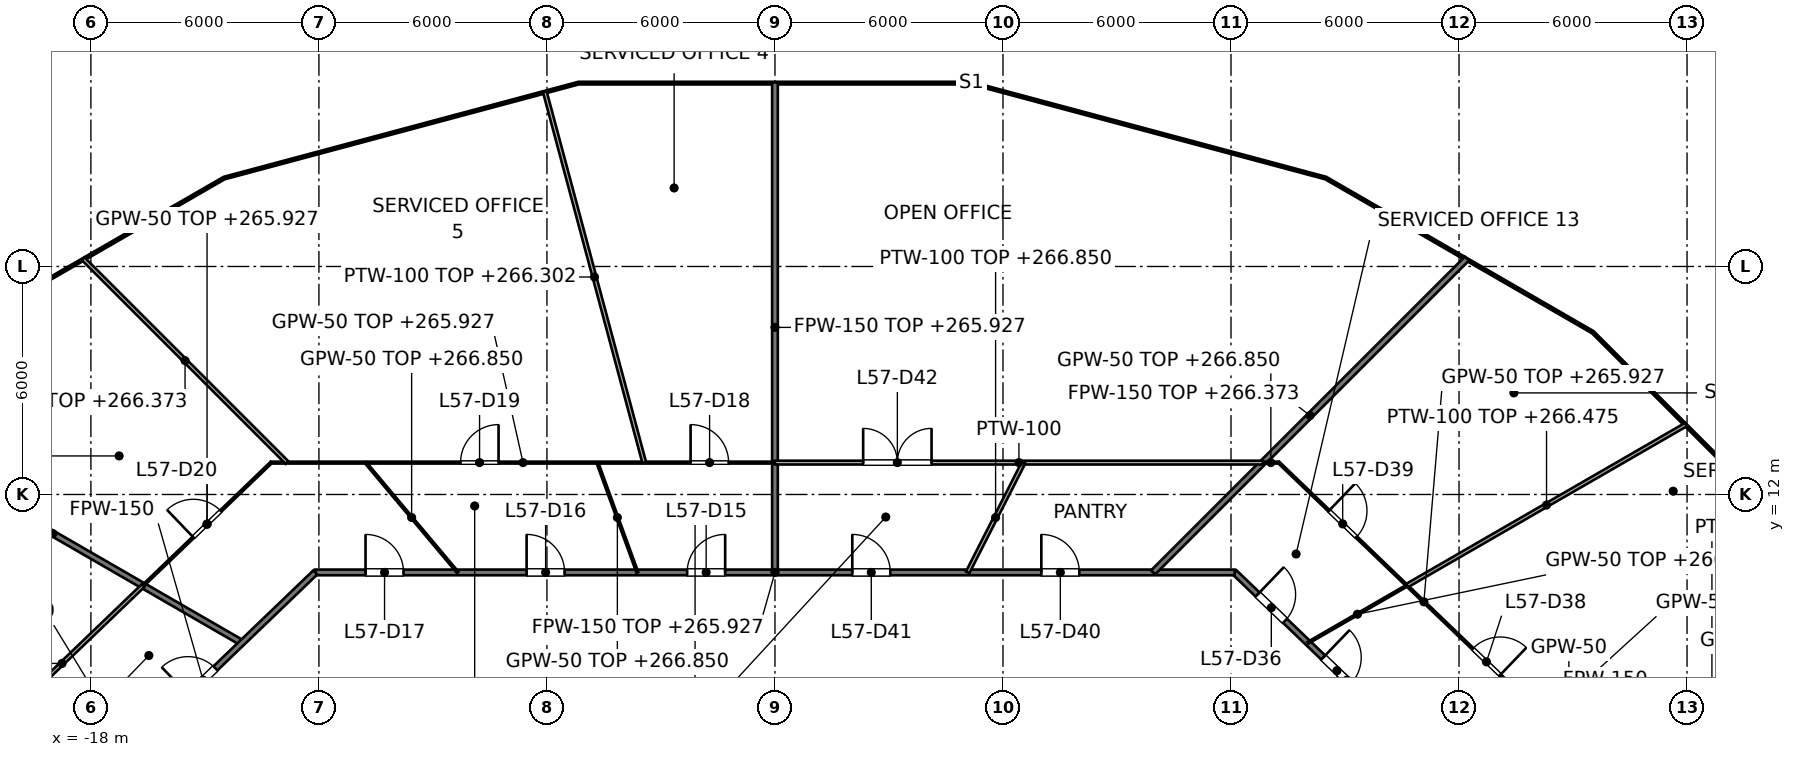
"""IFC4 building model, lengths in metres.
Left out: names, types, materials, properties, quantities, classifications, styles, units other than length and angle.
Written with IfcOpenShell. Run it as: python <this file> out.ifc"""

import sys

from ifc_helpers import new_model, si_unit, direction, frame, frame_2d, origin, place, context, subcontext, project, spatial, rectangle, extrude, element, fill, save


model = new_model("IFC4")
c1 = context("Model", 3, precision=1e-05, world=origin(), true_north=direction((0.0, 1.0)))
c2 = subcontext(c1, "Body", "Model", "MODEL_VIEW")
j1 = project(units=[si_unit("LENGTHUNIT", "METRE"), si_unit("PLANEANGLEUNIT", "RADIAN")], contexts=[c1])
p1 = place(None, origin())
s1 = spatial("IfcSite", under=j1, at=p1, CompositionType="ELEMENT")
p2 = place(p1, origin())
s2 = spatial("IfcBuilding", under=s1, at=p2, CompositionType="ELEMENT")
p3 = place(p2, frame((0.0, 0.0, 263.0)))
s3 = spatial("IfcBuildingStorey", under=s2, at=p3, CompositionType="ELEMENT", Elevation=263.0)
p4 = place(p3, frame((12.095, 9.949, 0.0), z_axis=(0.0, 0.0, 1.0), x_axis=(0.721290181137, -0.692633001376, 0.0)))
e1 = element("IfcWall", 1, at=p4, inside=s3, PredefinedType="PARTITIONING", context=c2, shape_type="SweptSolid", body=[
    extrude(rectangle(XDim=8.187, YDim=0.15, at=frame_2d((4.094, 0.0))), origin(), (0.0, 0.0, 1.0), 2.918),
])
p5 = place(p4, frame((3.232, 0.0, 0.0)))
e2 = element("IfcOpeningElement", 2, at=p5, cuts=e1, PredefinedType="OPENING", context=c2, shape_type="SweptSolid", body=[
    extrude(rectangle(XDim=1.0, YDim=2.1, at=frame_2d((0.5, 1.05))), frame((0.0, 0.075, 0.0), z_axis=(0.0, -1.0, 0.0), x_axis=(1.0, 0.0, 0.0)), (0.0, 0.0, 1.0), 0.15),
])
p6 = place(p4, frame((0.839, 0.0, 0.0)))
e3 = element("IfcOpeningElement", 3, at=p6, cuts=e1, PredefinedType="OPENING", context=c2, shape_type="SweptSolid", body=[
    extrude(rectangle(XDim=1.0, YDim=2.1, at=frame_2d((0.5, 1.05))), frame((0.0, 0.075, 0.0), z_axis=(0.0, -1.0, 0.0), x_axis=(1.0, 0.0, 0.0)), (0.0, 0.0, 1.0), 0.15),
])
p7 = place(p3, frame((-23.976, 13.843, 0.0), z_axis=(0.0, 0.0, 1.0), x_axis=(0.866017183011, -0.500014238528, 0.0)))
e4 = element("IfcWall", 4, at=p7, inside=s3, PredefinedType="PARTITIONING", context=c2, shape_type="SweptSolid", body=[
    extrude(rectangle(XDim=11.492, YDim=0.15, at=frame_2d((5.746, 0.0))), origin(), (0.0, 0.0, 1.0), 3.475),
])
p8 = place(p3, frame((-12.095, 9.949, 0.0), z_axis=(0.0, 0.0, 1.0), x_axis=(1.0, 0.0, 0.0)))
e5 = element("IfcWall", 5, at=p8, inside=s3, PredefinedType="PARTITIONING", context=c2, shape_type="SweptSolid", body=[
    extrude(rectangle(XDim=24.19, YDim=0.15, at=frame_2d((12.095, 0.0))), origin(), (0.0, 0.0, 1.0), 2.927),
])
p9 = place(p8, frame((9.784, 0.0, 0.0)))
e6 = element("IfcOpeningElement", 6, at=p9, cuts=e5, PredefinedType="OPENING", context=c2, shape_type="SweptSolid", body=[
    extrude(rectangle(XDim=1.0, YDim=2.1, at=frame_2d((0.5, 1.05))), frame((0.0, 0.075, 0.0), z_axis=(0.0, -1.0, 0.0), x_axis=(1.0, 0.0, 0.0)), (0.0, 0.0, 1.0), 0.15),
])
p10 = place(p8, frame((5.56, 0.0, 0.0)))
e7 = element("IfcOpeningElement", 7, at=p10, cuts=e5, PredefinedType="OPENING", context=c2, shape_type="SweptSolid", body=[
    extrude(rectangle(XDim=1.0, YDim=2.1, at=frame_2d((0.5, 1.05))), frame((0.0, 0.075, 0.0), z_axis=(0.0, -1.0, 0.0), x_axis=(1.0, 0.0, 0.0)), (0.0, 0.0, 1.0), 0.15),
])
p11 = place(p8, frame((1.322, 0.0, 0.0)))
e8 = element("IfcOpeningElement", 8, at=p11, cuts=e5, PredefinedType="OPENING", context=c2, shape_type="SweptSolid", body=[
    extrude(rectangle(XDim=1.0, YDim=2.1, at=frame_2d((0.5, 1.05))), frame((0.0, 0.075, 0.0), z_axis=(0.0, -1.0, 0.0), x_axis=(1.0, 0.0, 0.0)), (0.0, 0.0, 1.0), 0.15),
])
p12 = place(p8, frame((19.104, 0.0, 0.0)))
e9 = element("IfcOpeningElement", 9, at=p12, cuts=e5, PredefinedType="OPENING", context=c2, shape_type="SweptSolid", body=[
    extrude(rectangle(XDim=1.0, YDim=2.1, at=frame_2d((0.5, 1.05))), frame((0.0, 0.075, 0.0), z_axis=(0.0, -1.0, 0.0), x_axis=(1.0, 0.0, 0.0)), (0.0, 0.0, 1.0), 0.15),
])
p13 = place(p8, frame((14.129, 0.0, 0.0)))
e10 = element("IfcOpeningElement", 10, at=p13, cuts=e5, PredefinedType="OPENING", context=c2, shape_type="SweptSolid", body=[
    extrude(rectangle(XDim=1.0, YDim=2.1, at=frame_2d((0.5, 1.05))), frame((0.0, 0.075, 0.0), z_axis=(0.0, -1.0, 0.0), x_axis=(1.0, 0.0, 0.0)), (0.0, 0.0, 1.0), 0.15),
])
p14 = place(p3, frame((-18.0, 4.278, 0.0), z_axis=(0.0, 0.0, 1.0), x_axis=(0.721260976692, 0.69266341285, 0.0)))
e11 = element("IfcWall", 11, at=p14, inside=s3, PredefinedType="PARTITIONING", context=c2, shape_type="SweptSolid", body=[
    extrude(rectangle(XDim=8.187, YDim=0.15, at=frame_2d((4.094, 0.0))), origin(), (0.0, 0.0, 1.0), 2.918),
])
p15 = place(p14, frame((3.544, 0.0, 0.0)))
e12 = element("IfcOpeningElement", 12, at=p15, cuts=e11, PredefinedType="OPENING", context=c2, shape_type="SweptSolid", body=[
    extrude(rectangle(XDim=1.0, YDim=2.1, at=frame_2d((0.5, 1.05))), frame((0.0, 0.075, 0.0), z_axis=(0.0, -1.0, 0.0), x_axis=(1.0, 0.0, 0.0)), (0.0, 0.0, 1.0), 0.15),
])
p16 = place(p3, frame((9.949, 9.949, 0.0), z_axis=(0.0, 0.0, 1.0), x_axis=(0.707106781187, 0.707106781187, 0.0)))
e13 = element("IfcWall", 13, at=p16, inside=s3, PredefinedType="PARTITIONING", context=c2, shape_type="SweptSolid", body=[
    extrude(rectangle(XDim=11.677, YDim=0.15, at=frame_2d((5.839, 0.0))), origin(), (0.0, 0.0, 1.0), 3.373),
])
p17 = place(p3, frame((0.0, 9.949, 0.0), z_axis=(0.0, 0.0, 1.0), x_axis=(0.0, 1.0, 0.0)))
e14 = element("IfcWall", 14, at=p17, inside=s3, PredefinedType="PARTITIONING", context=c2, shape_type="SweptSolid", body=[
    extrude(rectangle(XDim=12.896, YDim=0.15, at=frame_2d((6.448, 0.0))), origin(), (0.0, 0.0, 1.0), 2.927),
])
p18 = place(p3, frame((-4.673, 12.839, 0.0), z_axis=(0.0, 0.0, 1.0), x_axis=(0.342042598731, -0.939684447383, 0.0)))
e15 = element("IfcWall", 15, at=p18, inside=s3, PredefinedType="PARTITIONING", context=c2, shape_type="SweptSolid", body=[
    extrude(rectangle(XDim=3.076, YDim=0.05, at=frame_2d((1.538, 0.0))), origin(), (0.0, 0.0, 1.0), 3.85),
])
p19 = place(p3, frame((-10.773, 12.839, 0.0), z_axis=(0.0, 0.0, 1.0), x_axis=(0.642777681898, -0.766052773413, 0.0)))
e16 = element("IfcWall", 16, at=p19, inside=s3, PredefinedType="PARTITIONING", context=c2, shape_type="SweptSolid", body=[
    extrude(rectangle(XDim=3.773, YDim=0.05, at=frame_2d((1.886, 0.0))), origin(), (0.0, 0.0, 1.0), 3.85),
])
p20 = place(p3, frame((13.258, 12.839, 0.0), z_axis=(0.0, 0.0, 1.0), x_axis=(0.721469843217, -0.692445857327, 0.0)))
e17 = element("IfcWall", 17, at=p20, inside=s3, PredefinedType="PARTITIONING", context=c2, shape_type="SweptSolid", body=[
    extrude(rectangle(XDim=10.582, YDim=0.05, at=frame_2d((5.291, 0.0))), origin(), (0.0, 0.0, 1.0), 2.927),
])
p21 = place(p20, frame((7.072, 0.0, 0.0)))
e18 = element("IfcOpeningElement", 18, at=p21, cuts=e17, PredefinedType="OPENING", context=c2, shape_type="SweptSolid", body=[
    extrude(rectangle(XDim=1.0, YDim=2.1, at=frame_2d((0.5, 1.05))), frame((0.0, 0.025, 0.0), z_axis=(0.0, -1.0, 0.0), x_axis=(1.0, 0.0, 0.0)), (0.0, 0.0, 1.0), 0.05),
])
p22 = place(p20, frame((1.83, 0.0, 0.0)))
e19 = element("IfcOpeningElement", 19, at=p22, cuts=e17, PredefinedType="OPENING", context=c2, shape_type="SweptSolid", body=[
    extrude(rectangle(XDim=1.0, YDim=2.1, at=frame_2d((0.5, 1.05))), frame((0.0, 0.025, 0.0), z_axis=(0.0, -1.0, 0.0), x_axis=(1.0, 0.0, 0.0)), (0.0, 0.0, 1.0), 0.05),
])
p23 = place(p3, frame((-13.258, 12.839, 0.0), z_axis=(0.0, 0.0, 1.0), x_axis=(1.0, 0.0, 0.0)))
e20 = element("IfcWall", 20, at=p23, inside=s3, PredefinedType="PARTITIONING", context=c2, shape_type="SweptSolid", body=[
    extrude(rectangle(XDim=13.258, YDim=0.05, at=frame_2d((6.629, 0.0))), origin(), (0.0, 0.0, 1.0), 2.927),
])
p24 = place(p23, frame((11.038, 0.0, 0.0)))
e21 = element("IfcOpeningElement", 21, at=p24, cuts=e20, PredefinedType="OPENING", context=c2, shape_type="SweptSolid", body=[
    extrude(rectangle(XDim=1.0, YDim=2.1, at=frame_2d((0.5, 1.05))), frame((0.0, 0.025, 0.0), z_axis=(0.0, -1.0, 0.0), x_axis=(1.0, 0.0, 0.0)), (0.0, 0.0, 1.0), 0.05),
])
p25 = place(p23, frame((4.985, 0.0, 0.0)))
e22 = element("IfcOpeningElement", 22, at=p25, cuts=e20, PredefinedType="OPENING", context=c2, shape_type="SweptSolid", body=[
    extrude(rectangle(XDim=1.0, YDim=2.1, at=frame_2d((0.5, 1.05))), frame((0.0, 0.025, 0.0), z_axis=(0.0, -1.0, 0.0), x_axis=(1.0, 0.0, 0.0)), (0.0, 0.0, 1.0), 0.05),
])
p26 = place(p3, frame((12.839, 12.839, 0.0), z_axis=(0.0, 0.0, 1.0), x_axis=(1.0, 0.0, 0.0)))
e23 = element("IfcWall", 23, at=p26, inside=s3, PredefinedType="PARTITIONING", context=c2, shape_type="SweptSolid", body=[
    extrude(rectangle(XDim=0.419, YDim=0.05, at=frame_2d((0.209, 0.0))), origin(), (0.0, 0.0, 1.0), 3.85),
])
p27 = place(p3, frame((14.024, 8.097, 0.0), z_axis=(0.0, 0.0, 1.0), x_axis=(0.86600176378, 0.500040943453, 0.0)))
e24 = element("IfcWall", 24, at=p27, inside=s3, PredefinedType="PARTITIONING", context=c2, shape_type="SweptSolid", body=[
    extrude(rectangle(XDim=3.008, YDim=0.05, at=frame_2d((1.504, 0.0))), origin(), (0.0, 0.0, 1.0), 3.85),
])
p28 = place(p3, frame((-16.629, 9.601, 0.0), z_axis=(0.0, 0.0, 1.0), x_axis=(0.721171224294, 0.692756858681, 0.0)))
e25 = element("IfcWall", 25, at=p28, inside=s3, PredefinedType="PARTITIONING", context=c2, shape_type="SweptSolid", body=[
    extrude(rectangle(XDim=4.674, YDim=0.05, at=frame_2d((2.337, 0.0))), origin(), (0.0, 0.0, 1.0), 2.927),
])
p29 = place(p28, frame((1.837, 0.0, 0.0)))
e26 = element("IfcOpeningElement", 26, at=p29, cuts=e25, PredefinedType="OPENING", context=c2, shape_type="SweptSolid", body=[
    extrude(rectangle(XDim=1.0, YDim=2.1, at=frame_2d((0.5, 1.05))), frame((0.0, 0.025, 0.0), z_axis=(0.0, -1.0, 0.0), x_axis=(1.0, 0.0, 0.0)), (0.0, 0.0, 1.0), 0.05),
])
p30 = place(p3, frame((-6.058, 22.607, 0.0), z_axis=(0.0, 0.0, 1.0), x_axis=(0.258900601614, -0.965903969597, 0.0)))
e27 = element("IfcWall", 27, at=p30, inside=s3, PredefinedType="PARTITIONING", context=c2, shape_type="SweptSolid", body=[
    extrude(rectangle(XDim=10.113, YDim=0.1, at=frame_2d((5.056, 0.0))), origin(), (0.0, 0.0, 1.0), 3.302),
])
p31 = place(p3, frame((-18.206, 18.206, 0.0), z_axis=(0.0, 0.0, 1.0), x_axis=(0.707106781187, -0.707106781187, 0.0)))
e28 = element("IfcWall", 28, at=p31, inside=s3, PredefinedType="PARTITIONING", context=c2, shape_type="SweptSolid", body=[
    extrude(rectangle(XDim=7.59, YDim=0.1, at=frame_2d((3.795, 0.0))), origin(), (0.0, 0.0, 1.0), 3.373),
])
p32 = place(p3, frame((0.0, 12.839, 0.0), z_axis=(0.0, 0.0, 1.0), x_axis=(1.0, 0.0, 0.0)))
e29 = element("IfcWall", 29, at=p32, inside=s3, PredefinedType="PARTITIONING", context=c2, shape_type="SweptSolid", body=[
    extrude(rectangle(XDim=12.839, YDim=0.1, at=frame_2d((6.419, 0.0))), origin(), (0.0, 0.0, 1.0), 2.927),
])
p33 = place(p32, frame((2.32, 0.0, 0.0)))
e30 = element("IfcOpeningElement", 30, at=p33, cuts=e29, PredefinedType="OPENING", context=c2, shape_type="SweptSolid", body=[
    extrude(rectangle(XDim=1.8, YDim=2.1, at=frame_2d((0.9, 1.05))), frame((0.0, 0.05, 0.0), z_axis=(0.0, -1.0, 0.0), x_axis=(1.0, 0.0, 0.0)), (0.0, 0.0, 1.0), 0.1),
])
p34 = place(p3, frame((20.818, 5.578, 0.0), z_axis=(0.0, 0.0, 1.0), x_axis=(0.965918966196, 0.258844645962, 0.0)))
e31 = element("IfcWall", 31, at=p34, inside=s3, PredefinedType="PARTITIONING", context=c2, shape_type="SweptSolid", body=[
    extrude(rectangle(XDim=7.944, YDim=0.1, at=frame_2d((3.972, 0.0))), origin(), (0.0, 0.0, 1.0), 3.527),
])
p35 = place(p3, frame((16.629, 9.601, 0.0), z_axis=(0.0, 0.0, 1.0), x_axis=(0.866022649921, 0.500004769801, 0.0)))
e32 = element("IfcWall", 32, at=p35, inside=s3, PredefinedType="PARTITIONING", context=c2, shape_type="SweptSolid", body=[
    extrude(rectangle(XDim=8.484, YDim=0.1, at=frame_2d((4.242, 0.0))), origin(), (0.0, 0.0, 1.0), 3.475),
])
p36 = place(p3, frame((-20.89, 5.509, 0.0), z_axis=(0.0, 0.0, 1.0), x_axis=(0.721443476428, 0.692473328237, 0.0)))
e33 = element("IfcWall", 33, at=p36, inside=s3, PredefinedType="PARTITIONING", context=c2, shape_type="SweptSolid", body=[
    extrude(rectangle(XDim=5.907, YDim=0.1, at=frame_2d((2.954, 0.0))), origin(), (0.0, 0.0, 1.0), 2.927),
])
p37 = place(p3, frame((5.069, 9.949, 0.0), z_axis=(0.0, 0.0, 1.0), x_axis=(0.454064453845, 0.890968838823, 0.0)))
e34 = element("IfcWall", 34, at=p37, inside=s3, PredefinedType="PARTITIONING", context=c2, shape_type="SweptSolid", body=[
    extrude(rectangle(XDim=3.244, YDim=0.1, at=frame_2d((1.622, 0.0))), origin(), (0.0, 0.0, 1.0), 3.85),
])
p38 = place(p9, origin())
e35 = element("IfcDoor", 35, at=p38, inside=s3, OperationType="SINGLE_SWING_RIGHT", PredefinedType="DOOR", context=c2, shape_type="SweptSolid", body=[
    extrude(rectangle(XDim=1.0, YDim=2.1, at=frame_2d((0.5, 1.05))), frame((0.0, 0.025, 0.0), z_axis=(0.0, -1.0, 0.0), x_axis=(1.0, 0.0, 0.0)), (0.0, 0.0, 1.0), 0.05),
])
fill(e6, e35)
p39 = place(p10, origin())
e36 = element("IfcDoor", 36, at=p39, inside=s3, OperationType="SINGLE_SWING_LEFT", PredefinedType="DOOR", context=c2, shape_type="SweptSolid", body=[
    extrude(rectangle(XDim=1.0, YDim=2.1, at=frame_2d((0.5, 1.05))), frame((0.0, 0.025, 0.0), z_axis=(0.0, -1.0, 0.0), x_axis=(1.0, 0.0, 0.0)), (0.0, 0.0, 1.0), 0.05),
])
fill(e7, e36)
p40 = place(p11, origin())
e37 = element("IfcDoor", 37, at=p40, inside=s3, OperationType="SINGLE_SWING_LEFT", PredefinedType="DOOR", context=c2, shape_type="SweptSolid", body=[
    extrude(rectangle(XDim=1.0, YDim=2.1, at=frame_2d((0.5, 1.05))), frame((0.0, 0.025, 0.0), z_axis=(0.0, -1.0, 0.0), x_axis=(1.0, 0.0, 0.0)), (0.0, 0.0, 1.0), 0.05),
])
fill(e8, e37)
p41 = place(p24, origin())
e38 = element("IfcDoor", 38, at=p41, inside=s3, OperationType="SINGLE_SWING_LEFT", PredefinedType="DOOR", context=c2, shape_type="SweptSolid", body=[
    extrude(rectangle(XDim=1.0, YDim=2.1, at=frame_2d((0.5, 1.05))), frame((0.0, 0.025, 0.0), z_axis=(0.0, -1.0, 0.0), x_axis=(1.0, 0.0, 0.0)), (0.0, 0.0, 1.0), 0.05),
])
fill(e21, e38)
p42 = place(p25, origin())
e39 = element("IfcDoor", 39, at=p42, inside=s3, OperationType="SINGLE_SWING_RIGHT", PredefinedType="DOOR", context=c2, shape_type="SweptSolid", body=[
    extrude(rectangle(XDim=1.0, YDim=2.1, at=frame_2d((0.5, 1.05))), frame((0.0, 0.025, 0.0), z_axis=(0.0, -1.0, 0.0), x_axis=(1.0, 0.0, 0.0)), (0.0, 0.0, 1.0), 0.05),
])
fill(e22, e39)
p43 = place(p29, origin())
e40 = element("IfcDoor", 40, at=p43, inside=s3, OperationType="SINGLE_SWING_LEFT", PredefinedType="DOOR", context=c2, shape_type="SweptSolid", body=[
    extrude(rectangle(XDim=1.0, YDim=2.1, at=frame_2d((0.5, 1.05))), frame((0.0, 0.025, 0.0), z_axis=(0.0, -1.0, 0.0), x_axis=(1.0, 0.0, 0.0)), (0.0, 0.0, 1.0), 0.05),
])
fill(e26, e40)
p44 = place(p15, origin())
e41 = element("IfcDoor", 41, at=p44, inside=s3, OperationType="SINGLE_SWING_LEFT", PredefinedType="DOOR", context=c2, shape_type="SweptSolid", body=[
    extrude(rectangle(XDim=1.0, YDim=2.1, at=frame_2d((0.5, 1.05))), frame((0.0, 0.025, 0.0), z_axis=(0.0, -1.0, 0.0), x_axis=(1.0, 0.0, 0.0)), (0.0, 0.0, 1.0), 0.05),
])
fill(e12, e41)
p45 = place(p5, origin())
e42 = element("IfcDoor", 42, at=p45, inside=s3, OperationType="SINGLE_SWING_LEFT", PredefinedType="DOOR", context=c2, shape_type="SweptSolid", body=[
    extrude(rectangle(XDim=1.0, YDim=2.1, at=frame_2d((0.5, 1.05))), frame((0.0, 0.025, 0.0), z_axis=(0.0, -1.0, 0.0), x_axis=(1.0, 0.0, 0.0)), (0.0, 0.0, 1.0), 0.05),
])
fill(e2, e42)
p46 = place(p6, origin())
e43 = element("IfcDoor", 43, at=p46, inside=s3, OperationType="SINGLE_SWING_LEFT", PredefinedType="DOOR", context=c2, shape_type="SweptSolid", body=[
    extrude(rectangle(XDim=1.0, YDim=2.1, at=frame_2d((0.5, 1.05))), frame((0.0, 0.025, 0.0), z_axis=(0.0, -1.0, 0.0), x_axis=(1.0, 0.0, 0.0)), (0.0, 0.0, 1.0), 0.05),
])
fill(e3, e43)
p47 = place(p21, origin())
e44 = element("IfcDoor", 44, at=p47, inside=s3, OperationType="SINGLE_SWING_RIGHT", PredefinedType="DOOR", context=c2, shape_type="SweptSolid", body=[
    extrude(rectangle(XDim=1.0, YDim=2.1, at=frame_2d((0.5, 1.05))), frame((0.0, 0.025, 0.0), z_axis=(0.0, -1.0, 0.0), x_axis=(1.0, 0.0, 0.0)), (0.0, 0.0, 1.0), 0.05),
])
fill(e18, e44)
p48 = place(p22, origin())
e45 = element("IfcDoor", 45, at=p48, inside=s3, OperationType="SINGLE_SWING_LEFT", PredefinedType="DOOR", context=c2, shape_type="SweptSolid", body=[
    extrude(rectangle(XDim=1.0, YDim=2.1, at=frame_2d((0.5, 1.05))), frame((0.0, 0.025, 0.0), z_axis=(0.0, -1.0, 0.0), x_axis=(1.0, 0.0, 0.0)), (0.0, 0.0, 1.0), 0.05),
])
fill(e19, e45)
p49 = place(p12, origin())
e46 = element("IfcDoor", 46, at=p49, inside=s3, OperationType="SINGLE_SWING_LEFT", PredefinedType="DOOR", context=c2, shape_type="SweptSolid", body=[
    extrude(rectangle(XDim=1.0, YDim=2.1, at=frame_2d((0.5, 1.05))), frame((0.0, 0.025, 0.0), z_axis=(0.0, -1.0, 0.0), x_axis=(1.0, 0.0, 0.0)), (0.0, 0.0, 1.0), 0.05),
])
fill(e9, e46)
p50 = place(p13, origin())
e47 = element("IfcDoor", 47, at=p50, inside=s3, OperationType="SINGLE_SWING_LEFT", PredefinedType="DOOR", context=c2, shape_type="SweptSolid", body=[
    extrude(rectangle(XDim=1.0, YDim=2.1, at=frame_2d((0.5, 1.05))), frame((0.0, 0.025, 0.0), z_axis=(0.0, -1.0, 0.0), x_axis=(1.0, 0.0, 0.0)), (0.0, 0.0, 1.0), 0.05),
])
fill(e10, e47)
p51 = place(p33, origin())
e48 = element("IfcDoor", 48, at=p51, inside=s3, OperationType="DOUBLE_DOOR_SINGLE_SWING", PredefinedType="DOOR", context=c2, shape_type="SweptSolid", body=[
    extrude(rectangle(XDim=1.8, YDim=2.1, at=frame_2d((0.9, 1.05))), frame((0.0, 0.025, 0.0), z_axis=(0.0, -1.0, 0.0), x_axis=(1.0, 0.0, 0.0)), (0.0, 0.0, 1.0), 0.05),
])
fill(e30, e48)
save(model, sys.argv[1])
